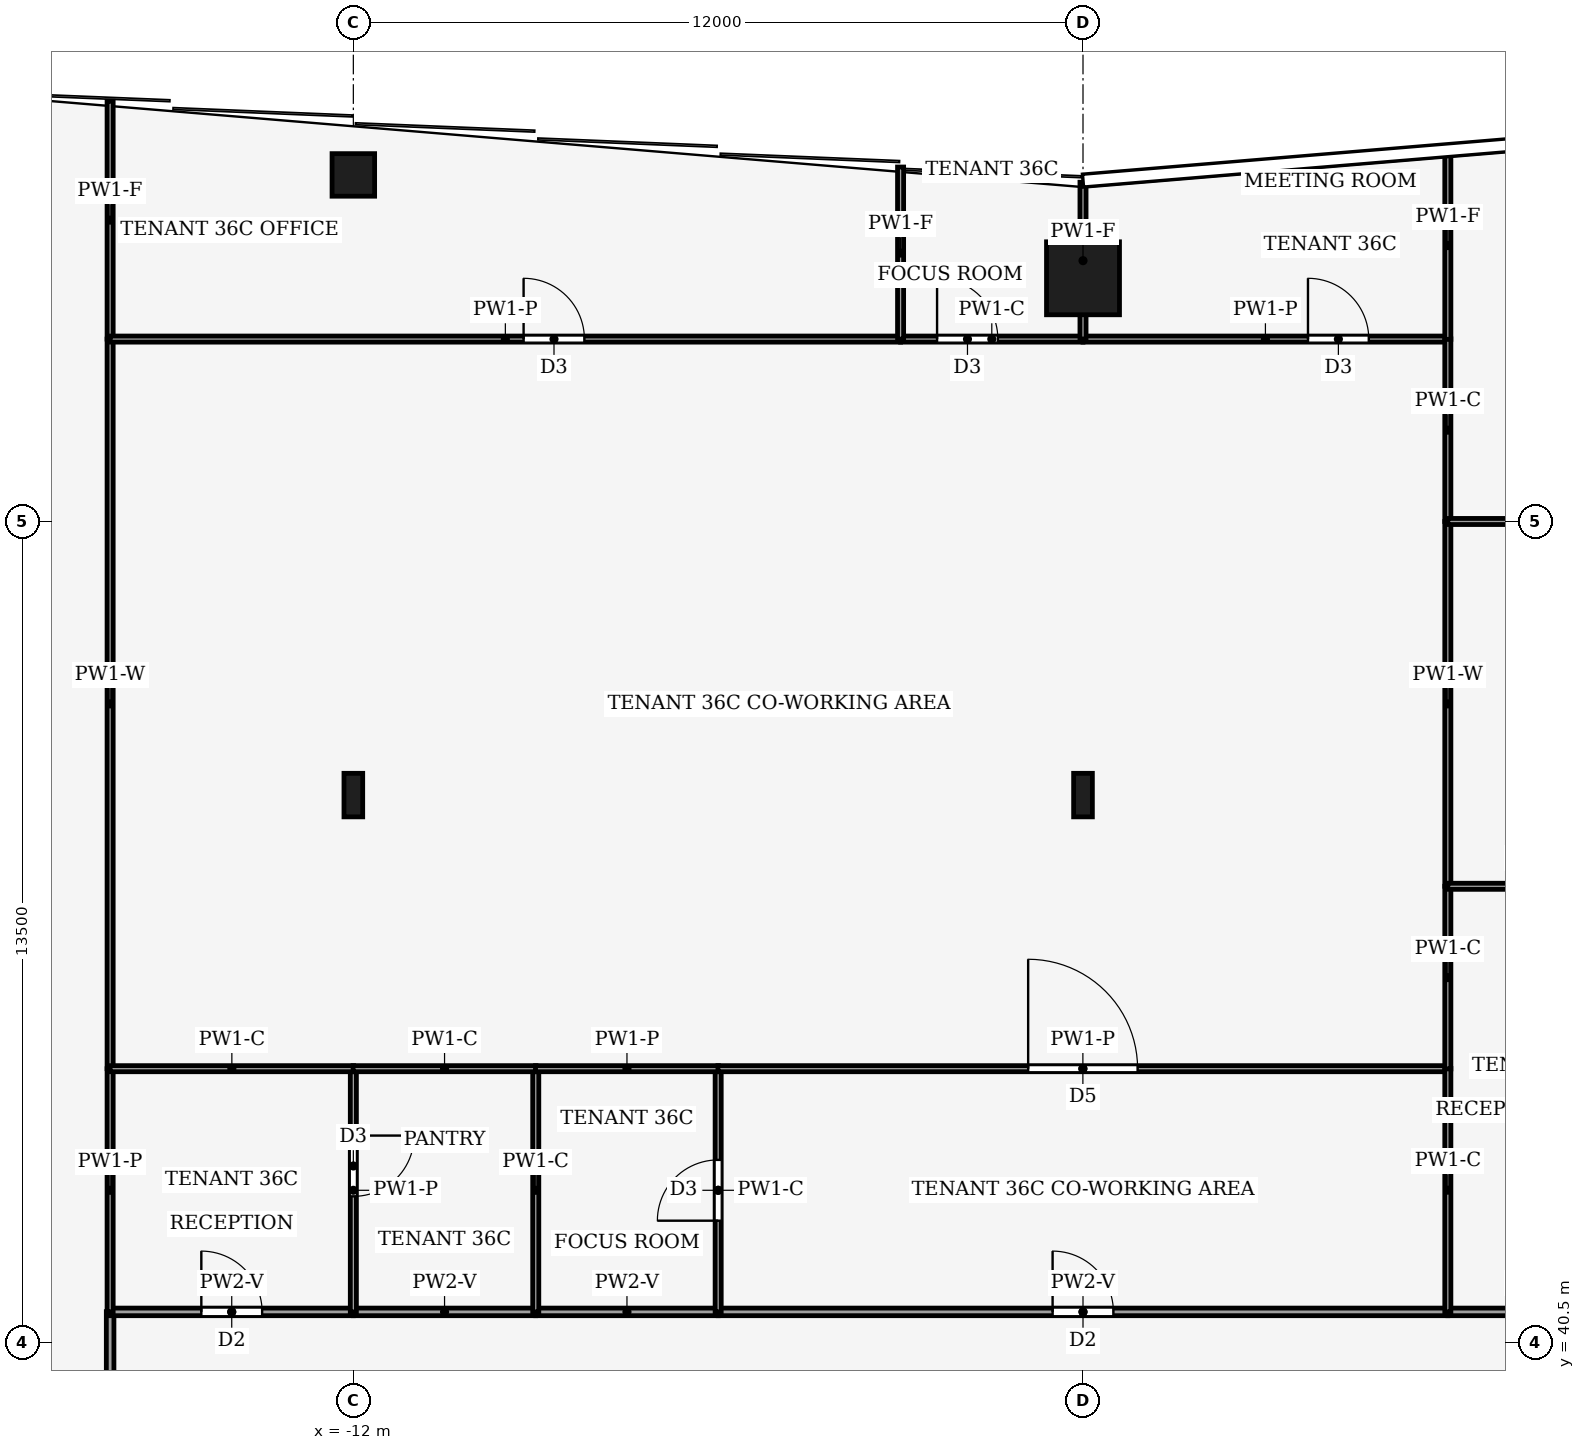
"""IFC4 building model, lengths in metres.
Left out: names, types, materials, properties, quantities, classifications, styles, units other than length and angle.
Written with IfcOpenShell. Run it as: python <this file> out.ifc"""

import sys

from ifc_helpers import new_model, si_unit, direction, frame, frame_2d, origin, origin_2d, place, context, subcontext, project, spatial, rectangle, hollow_rectangle, i_section, extrude, element, fill, save


model = new_model("IFC4")
c1 = context("Model", 3, precision=1e-05, world=origin(), true_north=direction((0.0, 1.0)))
c2 = subcontext(c1, "Body", "Model", "MODEL_VIEW")
j1 = project(units=[si_unit("LENGTHUNIT", "METRE"), si_unit("PLANEANGLEUNIT", "RADIAN")], contexts=[c1])
p1 = place(None, origin())
s1 = spatial("IfcSite", under=j1, at=p1, CompositionType="ELEMENT")
p2 = place(p1, origin())
s2 = spatial("IfcBuilding", under=s1, at=p2, CompositionType="ELEMENT")
p3 = place(p2, frame((0.0, 0.0, 158.0)))
s3 = spatial("IfcBuildingStorey", under=s2, at=p3, CompositionType="ELEMENT", Elevation=158.0)
p4 = place(p3, frame((0.0, 58.0, 0.0), z_axis=(0.0, 0.0, 1.0), x_axis=(1.0, 0.0, 0.0)))
e1 = element("IfcColumn", 1, at=p4, inside=s3, PredefinedType="COLUMN", context=c2, shape_type="SweptSolid", body=[
    extrude(hollow_rectangle(XDim=1.2, YDim=1.2, WallThickness=0.07, at=origin_2d()), origin(), (0.0, 0.0, 1.0), 4.0),
])
p5 = place(p3, frame((-12.0, 59.7, 0.0), z_axis=(0.0, 0.0, 1.0), x_axis=(1.0, 0.0, 0.0)))
e2 = element("IfcColumn", 2, at=p5, inside=s3, PredefinedType="COLUMN", context=c2, shape_type="SweptSolid", body=[
    extrude(hollow_rectangle(XDim=0.7, YDim=0.7, WallThickness=0.03, at=origin_2d()), origin(), (0.0, 0.0, 1.0), 4.0),
])
for number, where, z_axis, x_axis in (
    (3, (-12.0, 49.5, 0.0), (0.0, 0.0, 1.0), (1.0, 0.0, 0.0)),
    (4, (0.0, 49.5, 0.0), (0.0, 0.0, 1.0), (1.0, 0.0, 0.0)),
):
    element("IfcColumn", number, at=place(p3, frame(where, z_axis=z_axis, x_axis=x_axis)), inside=s3, PredefinedType="COLUMN", context=c2, shape_type="SweptSolid", body=[
        extrude(i_section(OverallWidth=0.308, OverallDepth=0.716, WebThickness=0.021, FlangeThickness=0.04, FilletRadius=0.027, at=origin_2d()), origin(), (0.0, 0.0, 1.0), 4.0),
    ])
p6 = place(p3, frame((-16.0, 41.004, 0.0), z_axis=(0.0, 0.0, 1.0), x_axis=(0.0, -1.0, 0.0)))
e5 = element("IfcWall", 5, at=p6, inside=s3, PredefinedType="PARTITIONING", context=c2, shape_type="SweptSolid", body=[
    extrude(rectangle(XDim=5.004, YDim=0.125, at=frame_2d((2.502, 0.0))), origin(), (0.0, 0.0, 1.0), 3.14),
])
p7 = place(p6, frame((1.602, 0.0, 0.0)))
e6 = element("IfcOpeningElement", 6, at=p7, cuts=e5, PredefinedType="OPENING", context=c2, shape_type="SweptSolid", body=[
    extrude(rectangle(XDim=1.8, YDim=2.1, at=frame_2d((0.9, 1.05))), frame((0.0, 0.073, 0.0), z_axis=(0.0, -1.0, 0.0), x_axis=(1.0, 0.0, 0.0)), (0.0, 0.0, 1.0), 0.145),
])
p8 = place(p3, frame((-16.0, 41.0, 0.0), z_axis=(0.0, 0.0, 1.0), x_axis=(1.0, 0.0, 0.0)))
e7 = element("IfcWall", 7, at=p8, inside=s3, PredefinedType="PARTITIONING", context=c2, shape_type="SweptSolid", body=[
    extrude(rectangle(XDim=4.0, YDim=0.125, at=frame_2d((2.0, 0.0))), origin(), (0.0, 0.0, 1.0), 3.44),
])
p9 = place(p8, frame((1.5, 0.0, 0.0)))
e8 = element("IfcOpeningElement", 8, at=p9, cuts=e7, PredefinedType="OPENING", context=c2, shape_type="SweptSolid", body=[
    extrude(rectangle(XDim=1.0, YDim=2.1, at=frame_2d((0.5, 1.05))), frame((0.0, 0.073, 0.0), z_axis=(0.0, -1.0, 0.0), x_axis=(1.0, 0.0, 0.0)), (0.0, 0.0, 1.0), 0.145),
])
for number, where, z_axis, x_axis in (
    (9, (-9.0, 41.0, 0.0), (0.0, 0.0, 1.0), (-1.0, 0.0, 0.0)),
    (10, (-6.0, 41.0, 0.0), (0.0, 0.0, 1.0), (-1.0, 0.0, 0.0)),
):
    element("IfcWall", number, at=place(p3, frame(where, z_axis=z_axis, x_axis=x_axis)), inside=s3, PredefinedType="PARTITIONING", context=c2, shape_type="SweptSolid", body=[
        extrude(rectangle(XDim=3.0, YDim=0.125, at=frame_2d((1.5, 0.0))), origin(), (0.0, 0.0, 1.0), 3.44),
    ])
p10 = place(p3, frame((-6.0, 41.0, 0.0), z_axis=(0.0, 0.0, 1.0), x_axis=(1.0, 0.0, 0.0)))
e11 = element("IfcWall", 11, at=p10, inside=s3, PredefinedType="PARTITIONING", context=c2, shape_type="SweptSolid", body=[
    extrude(rectangle(XDim=12.0, YDim=0.125, at=frame_2d((6.0, 0.0))), origin(), (0.0, 0.0, 1.0), 3.44),
])
p11 = place(p10, frame((5.5, 0.0, 0.0)))
e12 = element("IfcOpeningElement", 12, at=p11, cuts=e11, PredefinedType="OPENING", context=c2, shape_type="SweptSolid", body=[
    extrude(rectangle(XDim=1.0, YDim=2.1, at=frame_2d((0.5, 1.05))), frame((0.0, 0.073, 0.0), z_axis=(0.0, -1.0, 0.0), x_axis=(1.0, 0.0, 0.0)), (0.0, 0.0, 1.0), 0.145),
])
p12 = place(p3, frame((6.0, 41.0, 0.0), z_axis=(0.0, 0.0, 1.0), x_axis=(1.0, 0.0, 0.0)))
e13 = element("IfcWall", 13, at=p12, inside=s3, PredefinedType="PARTITIONING", context=c2, shape_type="SweptSolid", body=[
    extrude(rectangle(XDim=3.0, YDim=0.125, at=frame_2d((1.5, 0.0))), origin(), (0.0, 0.0, 1.0), 3.44),
])
p13 = place(p12, frame((1.0, 0.0, 0.0)))
e14 = element("IfcOpeningElement", 14, at=p13, cuts=e13, PredefinedType="OPENING", context=c2, shape_type="SweptSolid", body=[
    extrude(rectangle(XDim=1.0, YDim=2.1, at=frame_2d((0.5, 1.05))), frame((0.0, 0.073, 0.0), z_axis=(0.0, -1.0, 0.0), x_axis=(1.0, 0.0, 0.0)), (0.0, 0.0, 1.0), 0.145),
])
p14 = place(p3, frame((-16.0, 41.0, 0.0), z_axis=(0.0, 0.0, 1.0), x_axis=(0.0, 1.0, 0.0)))
e15 = element("IfcWall", 15, at=p14, inside=s3, PredefinedType="PARTITIONING", context=c2, shape_type="SweptSolid", body=[
    extrude(rectangle(XDim=4.0, YDim=0.1, at=frame_2d((2.0, 0.0))), origin(), (0.0, 0.0, 1.0), 3.44),
])
p15 = place(p3, frame((-16.0, 45.0, 0.0), z_axis=(0.0, 0.0, 1.0), x_axis=(0.0, 1.0, 0.0)))
e16 = element("IfcWall", 16, at=p15, inside=s3, PredefinedType="PARTITIONING", context=c2, shape_type="SweptSolid", body=[
    extrude(rectangle(XDim=12.0, YDim=0.1, at=frame_2d((6.0, 0.0))), origin(), (0.0, 0.0, 1.0), 3.24),
])
p16 = place(p3, frame((-16.0, 57.0, 0.0), z_axis=(0.0, 0.0, 1.0), x_axis=(0.0, 1.0, 0.0)))
e17 = element("IfcWall", 17, at=p16, inside=s3, PredefinedType="PARTITIONING", context=c2, shape_type="SweptSolid", body=[
    extrude(rectangle(XDim=3.913, YDim=0.1, at=frame_2d((1.957, 0.0))), origin(), (0.0, 0.0, 1.0), 3.04),
])
p17 = place(p3, frame((-12.0, 45.0, 0.0), z_axis=(0.0, 0.0, 1.0), x_axis=(0.0, -1.0, 0.0)))
e18 = element("IfcWall", 18, at=p17, inside=s3, PredefinedType="PARTITIONING", context=c2, shape_type="SweptSolid", body=[
    extrude(rectangle(XDim=4.0, YDim=0.1, at=frame_2d((2.0, 0.0))), origin(), (0.0, 0.0, 1.0), 3.44),
])
p18 = place(p17, frame((1.1, 0.0, 0.0)))
e19 = element("IfcOpeningElement", 19, at=p18, cuts=e18, PredefinedType="OPENING", context=c2, shape_type="SweptSolid", body=[
    extrude(rectangle(XDim=1.0, YDim=2.1, at=frame_2d((0.5, 1.05))), frame((0.0, 0.06, 0.0), z_axis=(0.0, -1.0, 0.0), x_axis=(1.0, 0.0, 0.0)), (0.0, 0.0, 1.0), 0.12),
])
p19 = place(p3, frame((-11.996, 45.0, 0.0), z_axis=(0.0, 0.0, 1.0), x_axis=(-1.0, 0.0, 0.0)))
e20 = element("IfcWall", 20, at=p19, inside=s3, PredefinedType="PARTITIONING", context=c2, shape_type="SweptSolid", body=[
    extrude(rectangle(XDim=4.004, YDim=0.1, at=frame_2d((2.002, 0.0))), origin(), (0.0, 0.0, 1.0), 3.87),
])
p20 = place(p3, frame((-9.0, 41.0, 0.0), z_axis=(0.0, 0.0, 1.0), x_axis=(0.0, 1.0, 0.0)))
e21 = element("IfcWall", 21, at=p20, inside=s3, PredefinedType="PARTITIONING", context=c2, shape_type="SweptSolid", body=[
    extrude(rectangle(XDim=4.0, YDim=0.1, at=frame_2d((2.0, 0.0))), origin(), (0.0, 0.0, 1.0), 3.87),
])
p21 = place(p3, frame((-8.996, 45.0, 0.0), z_axis=(0.0, 0.0, 1.0), x_axis=(-1.0, 0.0, 0.0)))
e22 = element("IfcWall", 22, at=p21, inside=s3, PredefinedType="PARTITIONING", context=c2, shape_type="SweptSolid", body=[
    extrude(rectangle(XDim=3.008, YDim=0.1, at=frame_2d((1.504, 0.0))), origin(), (0.0, 0.0, 1.0), 3.87),
])
p22 = place(p3, frame((-6.0, 41.0, 0.0), z_axis=(0.0, 0.0, 1.0), x_axis=(0.0, 1.0, 0.0)))
e23 = element("IfcWall", 23, at=p22, inside=s3, PredefinedType="PARTITIONING", context=c2, shape_type="SweptSolid", body=[
    extrude(rectangle(XDim=4.0, YDim=0.1, at=frame_2d((2.0, 0.0))), origin(), (0.0, 0.0, 1.0), 3.87),
])
p23 = place(p22, frame((1.5, 0.0, 0.0)))
e24 = element("IfcOpeningElement", 24, at=p23, cuts=e23, PredefinedType="OPENING", context=c2, shape_type="SweptSolid", body=[
    extrude(rectangle(XDim=1.0, YDim=2.1, at=frame_2d((0.5, 1.05))), frame((0.0, 0.06, 0.0), z_axis=(0.0, -1.0, 0.0), x_axis=(1.0, 0.0, 0.0)), (0.0, 0.0, 1.0), 0.12),
])
p24 = place(p3, frame((-5.996, 45.0, 0.0), z_axis=(0.0, 0.0, 1.0), x_axis=(-1.0, 0.0, 0.0)))
e25 = element("IfcWall", 25, at=p24, inside=s3, PredefinedType="PARTITIONING", context=c2, shape_type="SweptSolid", body=[
    extrude(rectangle(XDim=3.008, YDim=0.1, at=frame_2d((1.504, 0.0))), origin(), (0.0, 0.0, 1.0), 3.44),
])
p25 = place(p3, frame((-6.004, 45.0, 0.0), z_axis=(0.0, 0.0, 1.0), x_axis=(1.0, 0.0, 0.0)))
e26 = element("IfcWall", 26, at=p25, inside=s3, PredefinedType="PARTITIONING", context=c2, shape_type="SweptSolid", body=[
    extrude(rectangle(XDim=12.004, YDim=0.1, at=frame_2d((6.002, 0.0))), origin(), (0.0, 0.0, 1.0), 3.44),
])
p26 = place(p25, frame((5.102, 0.0, 0.0)))
e27 = element("IfcOpeningElement", 27, at=p26, cuts=e26, PredefinedType="OPENING", context=c2, shape_type="SweptSolid", body=[
    extrude(rectangle(XDim=1.8, YDim=2.1, at=frame_2d((0.9, 1.05))), frame((0.0, 0.06, 0.0), z_axis=(0.0, -1.0, 0.0), x_axis=(1.0, 0.0, 0.0)), (0.0, 0.0, 1.0), 0.12),
])
p27 = place(p3, frame((6.0, 41.0, 0.0), z_axis=(0.0, 0.0, 1.0), x_axis=(0.0, 1.0, 0.0)))
e28 = element("IfcWall", 28, at=p27, inside=s3, PredefinedType="PARTITIONING", context=c2, shape_type="SweptSolid", body=[
    extrude(rectangle(XDim=4.004, YDim=0.1, at=frame_2d((2.002, 0.0))), origin(), (0.0, 0.0, 1.0), 3.87),
])
p28 = place(p3, frame((-16.0, 57.0, 0.0), z_axis=(0.0, 0.0, 1.0), x_axis=(1.0, 0.0, 0.0)))
e29 = element("IfcWall", 29, at=p28, inside=s3, PredefinedType="PARTITIONING", context=c2, shape_type="SweptSolid", body=[
    extrude(rectangle(XDim=13.0, YDim=0.1, at=frame_2d((6.5, 0.0))), origin(), (0.0, 0.0, 1.0), 3.44),
])
p29 = place(p28, frame((6.8, 0.0, 0.0)))
e30 = element("IfcOpeningElement", 30, at=p29, cuts=e29, PredefinedType="OPENING", context=c2, shape_type="SweptSolid", body=[
    extrude(rectangle(XDim=1.0, YDim=2.1, at=frame_2d((0.5, 1.05))), frame((0.0, 0.06, 0.0), z_axis=(0.0, -1.0, 0.0), x_axis=(1.0, 0.0, 0.0)), (0.0, 0.0, 1.0), 0.12),
])
p30 = place(p3, frame((-3.0, 57.0, 0.0), z_axis=(0.0, 0.0, 1.0), x_axis=(1.0, 0.0, 0.0)))
e31 = element("IfcWall", 31, at=p30, inside=s3, PredefinedType="PARTITIONING", context=c2, shape_type="SweptSolid", body=[
    extrude(rectangle(XDim=3.0, YDim=0.1, at=frame_2d((1.5, 0.0))), origin(), (0.0, 0.0, 1.0), 3.87),
])
p31 = place(p30, frame((0.6, 0.0, 0.0)))
e32 = element("IfcOpeningElement", 32, at=p31, cuts=e31, PredefinedType="OPENING", context=c2, shape_type="SweptSolid", body=[
    extrude(rectangle(XDim=1.0, YDim=2.1, at=frame_2d((0.5, 1.05))), frame((0.0, 0.06, 0.0), z_axis=(0.0, -1.0, 0.0), x_axis=(1.0, 0.0, 0.0)), (0.0, 0.0, 1.0), 0.12),
])
p32 = place(p3, frame((0.0, 57.0, 0.0), z_axis=(0.0, 0.0, 1.0), x_axis=(1.0, 0.0, 0.0)))
e33 = element("IfcWall", 33, at=p32, inside=s3, PredefinedType="PARTITIONING", context=c2, shape_type="SweptSolid", body=[
    extrude(rectangle(XDim=6.0, YDim=0.1, at=frame_2d((3.0, 0.0))), origin(), (0.0, 0.0, 1.0), 3.44),
])
p33 = place(p32, frame((3.7, 0.0, 0.0)))
e34 = element("IfcOpeningElement", 34, at=p33, cuts=e33, PredefinedType="OPENING", context=c2, shape_type="SweptSolid", body=[
    extrude(rectangle(XDim=1.0, YDim=2.1, at=frame_2d((0.5, 1.05))), frame((0.0, 0.06, 0.0), z_axis=(0.0, -1.0, 0.0), x_axis=(1.0, 0.0, 0.0)), (0.0, 0.0, 1.0), 0.12),
])
p34 = place(p3, frame((6.0, 44.996, 0.0), z_axis=(0.0, 0.0, 1.0), x_axis=(0.0, 1.0, 0.0)))
e35 = element("IfcWall", 35, at=p34, inside=s3, PredefinedType="PARTITIONING", context=c2, shape_type="SweptSolid", body=[
    extrude(rectangle(XDim=3.004, YDim=0.1, at=frame_2d((1.502, 0.0))), origin(), (0.0, 0.0, 1.0), 3.87),
])
p35 = place(p3, frame((6.0, 48.0, 0.0), z_axis=(0.0, 0.0, 1.0), x_axis=(0.0, 1.0, 0.0)))
e36 = element("IfcWall", 36, at=p35, inside=s3, PredefinedType="PARTITIONING", context=c2, shape_type="SweptSolid", body=[
    extrude(rectangle(XDim=6.0, YDim=0.1, at=frame_2d((3.0, 0.0))), origin(), (0.0, 0.0, 1.0), 3.24),
])
p36 = place(p3, frame((6.0, 54.0, 0.0), z_axis=(0.0, 0.0, 1.0), x_axis=(0.0, 1.0, 0.0)))
e37 = element("IfcWall", 37, at=p36, inside=s3, PredefinedType="PARTITIONING", context=c2, shape_type="SweptSolid", body=[
    extrude(rectangle(XDim=3.004, YDim=0.1, at=frame_2d((1.502, 0.0))), origin(), (0.0, 0.0, 1.0), 3.87),
])
p37 = place(p3, frame((-3.0, 57.0, 0.0), z_axis=(0.0, 0.0, 1.0), x_axis=(0.0, 1.0, 0.0)))
e38 = element("IfcWall", 38, at=p37, inside=s3, PredefinedType="PARTITIONING", context=c2, shape_type="SweptSolid", body=[
    extrude(rectangle(XDim=2.83, YDim=0.1, at=frame_2d((1.415, 0.0))), origin(), (0.0, 0.0, 1.0), 3.04),
])
p38 = place(p3, frame((0.0, 57.0, 0.0), z_axis=(0.0, 0.0, 1.0), x_axis=(0.0, 1.0, 0.0)))
e39 = element("IfcWall", 39, at=p38, inside=s3, PredefinedType="PARTITIONING", context=c2, shape_type="SweptSolid", body=[
    extrude(rectangle(XDim=2.58, YDim=0.1, at=frame_2d((1.29, 0.0))), origin(), (0.0, 0.0, 1.0), 3.04),
])
p39 = place(p3, frame((6.0, 56.996, 0.0), z_axis=(0.0, 0.0, 1.0), x_axis=(0.0, 1.0, 0.0)))
e40 = element("IfcWall", 40, at=p39, inside=s3, PredefinedType="PARTITIONING", context=c2, shape_type="SweptSolid", body=[
    extrude(rectangle(XDim=3.084, YDim=0.1, at=frame_2d((1.542, 0.0))), origin(), (0.0, 0.0, 1.0), 3.04),
])
p40 = place(p3, frame((6.0, 48.0, 0.0), z_axis=(0.0, 0.0, 1.0), x_axis=(1.0, 0.0, 0.0)))
e41 = element("IfcWall", 41, at=p40, inside=s3, PredefinedType="PARTITIONING", context=c2, shape_type="SweptSolid", body=[
    extrude(rectangle(XDim=3.004, YDim=0.1, at=frame_2d((1.502, 0.0))), origin(), (0.0, 0.0, 1.0), 3.44),
])
p41 = place(p40, frame((1.002, 0.0, 0.0)))
e42 = element("IfcOpeningElement", 42, at=p41, cuts=e41, PredefinedType="OPENING", context=c2, shape_type="SweptSolid", body=[
    extrude(rectangle(XDim=1.0, YDim=2.1, at=frame_2d((0.5, 1.05))), frame((0.0, 0.06, 0.0), z_axis=(0.0, -1.0, 0.0), x_axis=(1.0, 0.0, 0.0)), (0.0, 0.0, 1.0), 0.12),
])
p42 = place(p3, frame((6.0, 54.0, 0.0), z_axis=(0.0, 0.0, 1.0), x_axis=(1.0, 0.0, 0.0)))
e43 = element("IfcWall", 43, at=p42, inside=s3, PredefinedType="PARTITIONING", context=c2, shape_type="SweptSolid", body=[
    extrude(rectangle(XDim=10.0, YDim=0.1, at=frame_2d((5.0, 0.0))), origin(), (0.0, 0.0, 1.0), 3.44),
])
p43 = place(p42, frame((4.5, 0.0, 0.0)))
e44 = element("IfcOpeningElement", 44, at=p43, cuts=e43, PredefinedType="OPENING", context=c2, shape_type="SweptSolid", body=[
    extrude(rectangle(XDim=1.0, YDim=2.1, at=frame_2d((0.5, 1.05))), frame((0.0, 0.06, 0.0), z_axis=(0.0, -1.0, 0.0), x_axis=(1.0, 0.0, 0.0)), (0.0, 0.0, 1.0), 0.12),
])
p44 = place(p9, origin())
e45 = element("IfcDoor", 45, at=p44, inside=s3, OperationType="SINGLE_SWING_LEFT", PredefinedType="DOOR", context=c2, shape_type="SweptSolid", body=[
    extrude(rectangle(XDim=1.0, YDim=2.1, at=frame_2d((0.5, 1.05))), frame((0.0, 0.025, 0.0), z_axis=(0.0, -1.0, 0.0), x_axis=(1.0, 0.0, 0.0)), (0.0, 0.0, 1.0), 0.05),
])
fill(e8, e45)
p45 = place(p11, origin())
e46 = element("IfcDoor", 46, at=p45, inside=s3, OperationType="SINGLE_SWING_RIGHT", PredefinedType="DOOR", context=c2, shape_type="SweptSolid", body=[
    extrude(rectangle(XDim=1.0, YDim=2.1, at=frame_2d((0.5, 1.05))), frame((0.0, 0.025, 0.0), z_axis=(0.0, -1.0, 0.0), x_axis=(1.0, 0.0, 0.0)), (0.0, 0.0, 1.0), 0.05),
])
fill(e12, e46)
p46 = place(p18, origin())
e47 = element("IfcDoor", 47, at=p46, inside=s3, OperationType="SINGLE_SWING_LEFT", PredefinedType="DOOR", context=c2, shape_type="SweptSolid", body=[
    extrude(rectangle(XDim=1.0, YDim=2.1, at=frame_2d((0.5, 1.05))), frame((0.0, 0.025, 0.0), z_axis=(0.0, -1.0, 0.0), x_axis=(1.0, 0.0, 0.0)), (0.0, 0.0, 1.0), 0.05),
])
fill(e19, e47)
p47 = place(p23, origin())
e48 = element("IfcDoor", 48, at=p47, inside=s3, OperationType="SINGLE_SWING_LEFT", PredefinedType="DOOR", context=c2, shape_type="SweptSolid", body=[
    extrude(rectangle(XDim=1.0, YDim=2.1, at=frame_2d((0.5, 1.05))), frame((0.0, 0.025, 0.0), z_axis=(0.0, -1.0, 0.0), x_axis=(1.0, 0.0, 0.0)), (0.0, 0.0, 1.0), 0.05),
])
fill(e24, e48)
p48 = place(p26, origin())
e49 = element("IfcDoor", 49, at=p48, inside=s3, OperationType="DOUBLE_DOOR_SINGLE_SWING", PredefinedType="DOOR", context=c2, shape_type="SweptSolid", body=[
    extrude(rectangle(XDim=1.8, YDim=2.1, at=frame_2d((0.9, 1.05))), frame((0.0, 0.025, 0.0), z_axis=(0.0, -1.0, 0.0), x_axis=(1.0, 0.0, 0.0)), (0.0, 0.0, 1.0), 0.05),
])
fill(e27, e49)
p49 = place(p29, origin())
e50 = element("IfcDoor", 50, at=p49, inside=s3, OperationType="SINGLE_SWING_RIGHT", PredefinedType="DOOR", context=c2, shape_type="SweptSolid", body=[
    extrude(rectangle(XDim=1.0, YDim=2.1, at=frame_2d((0.5, 1.05))), frame((0.0, 0.025, 0.0), z_axis=(0.0, -1.0, 0.0), x_axis=(1.0, 0.0, 0.0)), (0.0, 0.0, 1.0), 0.05),
])
fill(e30, e50)
p50 = place(p31, origin())
e51 = element("IfcDoor", 51, at=p50, inside=s3, OperationType="SINGLE_SWING_LEFT", PredefinedType="DOOR", context=c2, shape_type="SweptSolid", body=[
    extrude(rectangle(XDim=1.0, YDim=2.1, at=frame_2d((0.5, 1.05))), frame((0.0, 0.025, 0.0), z_axis=(0.0, -1.0, 0.0), x_axis=(1.0, 0.0, 0.0)), (0.0, 0.0, 1.0), 0.05),
])
fill(e32, e51)
p51 = place(p33, origin())
e52 = element("IfcDoor", 52, at=p51, inside=s3, OperationType="SINGLE_SWING_RIGHT", PredefinedType="DOOR", context=c2, shape_type="SweptSolid", body=[
    extrude(rectangle(XDim=1.0, YDim=2.1, at=frame_2d((0.5, 1.05))), frame((0.0, 0.025, 0.0), z_axis=(0.0, -1.0, 0.0), x_axis=(1.0, 0.0, 0.0)), (0.0, 0.0, 1.0), 0.05),
])
fill(e34, e52)
save(model, sys.argv[1])
